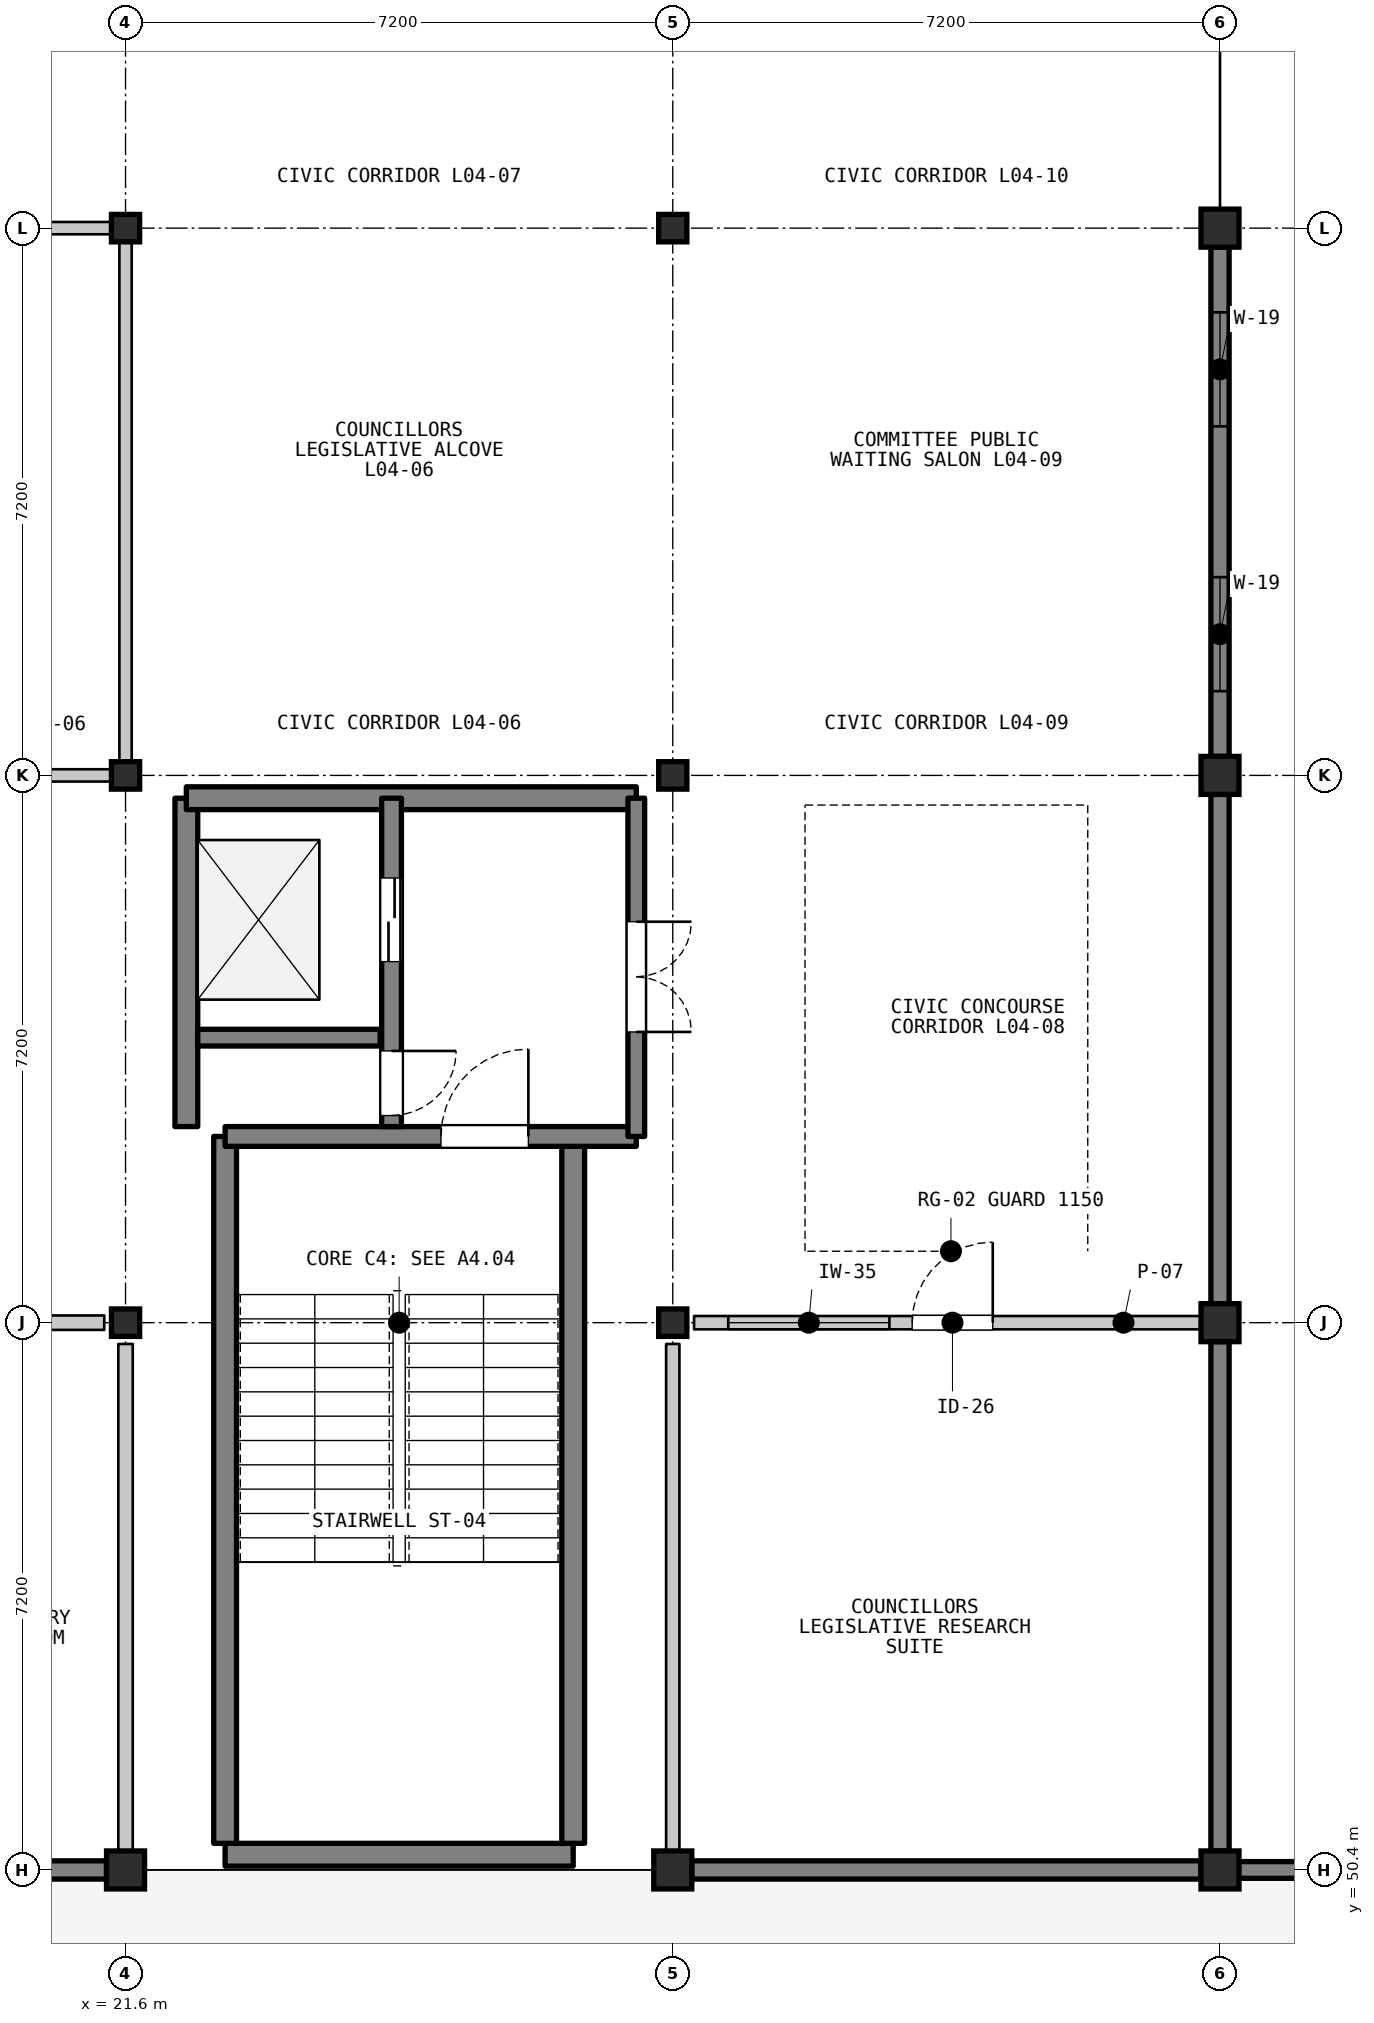
"""IFC4 building model, lengths in metres.
Left out: names, types, materials, properties, quantities, classifications, styles, units other than length and angle.
Written with IfcOpenShell. Run it as: python <this file> out.ifc"""

import sys

from ifc_helpers import new_model, si_unit, direction, frame, frame_2d, origin, origin_2d, place, context, subcontext, project, spatial, rectangle, i_section, extrude, element, fill, save


model = new_model("IFC4")
c1 = context("Model", 3, precision=1e-05, world=origin(), true_north=direction((0.0, 1.0)))
c2 = subcontext(c1, "Body", "Model", "MODEL_VIEW")
j1 = project(units=[si_unit("LENGTHUNIT", "METRE"), si_unit("PLANEANGLEUNIT", "RADIAN")], contexts=[c1])
p1 = place(None, origin())
s1 = spatial("IfcSite", under=j1, at=p1, CompositionType="ELEMENT")
p2 = place(p1, origin())
s2 = spatial("IfcBuilding", under=s1, at=p2, CompositionType="ELEMENT")
p3 = place(p2, frame((0.0, 0.0, 14.1)))
s3 = spatial("IfcBuildingStorey", under=s2, at=p3, CompositionType="ELEMENT", Elevation=14.1)
p4 = place(p3, frame((21.6, 50.4, 0.0), z_axis=(0.0, 0.0, 1.0), x_axis=(1.0, 0.0, 0.0)))
e1 = element("IfcColumn", 1, at=p4, inside=s3, PredefinedType="COLUMN", context=c2, shape_type="SweptSolid", body=[
    extrude(rectangle(XDim=0.5, YDim=0.5, at=origin_2d()), origin(), (0.0, 0.0, 1.0), 3.9),
])
for number, where, z_axis, x_axis in (
    (2, (21.6, 57.6, 0.0), (0.0, 0.0, 1.0), (1.0, 0.0, 0.0)),
    (3, (21.6, 64.8, 0.0), (0.0, 0.0, 1.0), (1.0, 0.0, 0.0)),
    (4, (21.6, 72.0, 0.0), (0.0, 0.0, 1.0), (1.0, 0.0, 0.0)),
):
    element("IfcColumn", number, at=place(p3, frame(where, z_axis=z_axis, x_axis=x_axis)), inside=s3, PredefinedType="COLUMN", context=c2, shape_type="SweptSolid", body=[
        extrude(i_section(OverallWidth=0.371, OverallDepth=0.361, WebThickness=0.012, FlangeThickness=0.02, FilletRadius=0.015, at=origin_2d()), origin(), (0.0, 0.0, 1.0), 3.9),
    ])
p5 = place(p3, frame((28.8, 50.4, 0.0), z_axis=(0.0, 0.0, 1.0), x_axis=(1.0, 0.0, 0.0)))
e5 = element("IfcColumn", 5, at=p5, inside=s3, PredefinedType="COLUMN", context=c2, shape_type="SweptSolid", body=[
    extrude(rectangle(XDim=0.5, YDim=0.5, at=origin_2d()), origin(), (0.0, 0.0, 1.0), 3.9),
])
for number, where, z_axis, x_axis in (
    (6, (28.8, 57.6, 0.0), (0.0, 0.0, 1.0), (1.0, 0.0, 0.0)),
    (7, (28.8, 64.8, 0.0), (0.0, 0.0, 1.0), (1.0, 0.0, 0.0)),
    (8, (28.8, 72.0, 0.0), (0.0, 0.0, 1.0), (1.0, 0.0, 0.0)),
):
    element("IfcColumn", number, at=place(p3, frame(where, z_axis=z_axis, x_axis=x_axis)), inside=s3, PredefinedType="COLUMN", context=c2, shape_type="SweptSolid", body=[
        extrude(i_section(OverallWidth=0.371, OverallDepth=0.361, WebThickness=0.012, FlangeThickness=0.02, FilletRadius=0.015, at=origin_2d()), origin(), (0.0, 0.0, 1.0), 3.9),
    ])
for number, where, z_axis, x_axis in (
    (9, (36.0, 50.4, 0.0), (0.0, 0.0, 1.0), (1.0, 0.0, 0.0)),
    (10, (36.0, 57.6, 0.0), (0.0, 0.0, 1.0), (1.0, 0.0, 0.0)),
    (11, (36.0, 64.8, 0.0), (0.0, 0.0, 1.0), (1.0, 0.0, 0.0)),
    (12, (36.0, 72.0, 0.0), (0.0, 0.0, 1.0), (1.0, 0.0, 0.0)),
):
    element("IfcColumn", number, at=place(p3, frame(where, z_axis=z_axis, x_axis=x_axis)), inside=s3, PredefinedType="COLUMN", context=c2, shape_type="SweptSolid", body=[
        extrude(rectangle(XDim=0.5, YDim=0.5, at=origin_2d()), origin(), (0.0, 0.0, 1.0), 3.9),
    ])
p6 = place(p3, frame((21.35, 50.4, 0.0), z_axis=(0.0, 0.0, 1.0), x_axis=(-1.0, 0.0, 0.0)))
e13 = element("IfcWall", 13, at=p6, inside=s3, PredefinedType="SOLIDWALL", context=c2, shape_type="SweptSolid", body=[
    extrude(rectangle(XDim=6.7, YDim=0.24, at=frame_2d((3.35, 0.0))), origin(), (0.0, 0.0, 1.0), 3.118),
])
p7 = place(p6, frame((1.008, 0.0, 0.95)))
e14 = element("IfcOpeningElement", 14, at=p7, cuts=e13, PredefinedType="OPENING", context=c2, shape_type="SweptSolid", body=[
    extrude(rectangle(XDim=1.2, YDim=1.7, at=frame_2d((0.6, 0.85))), frame((0.0, 0.13, 0.0), z_axis=(0.0, -1.0, 0.0), x_axis=(1.0, 0.0, 0.0)), (0.0, 0.0, 1.0), 0.26),
])
p8 = place(p6, frame((4.492, 0.0, 0.95)))
e15 = element("IfcOpeningElement", 15, at=p8, cuts=e13, PredefinedType="OPENING", context=c2, shape_type="SweptSolid", body=[
    extrude(rectangle(XDim=1.2, YDim=1.7, at=frame_2d((0.6, 0.85))), frame((0.0, 0.13, 0.0), z_axis=(0.0, -1.0, 0.0), x_axis=(1.0, 0.0, 0.0)), (0.0, 0.0, 1.0), 0.26),
])
p9 = place(p3, frame((35.75, 50.4, 0.0), z_axis=(0.0, 0.0, 1.0), x_axis=(-1.0, 0.0, 0.0)))
e16 = element("IfcWall", 16, at=p9, inside=s3, PredefinedType="SOLIDWALL", context=c2, shape_type="SweptSolid", body=[
    extrude(rectangle(XDim=6.7, YDim=0.24, at=frame_2d((3.35, 0.0))), origin(), (0.0, 0.0, 1.0), 3.118),
])
p10 = place(p3, frame((36.0, 57.35, 0.0), z_axis=(0.0, 0.0, 1.0), x_axis=(0.0, -1.0, 0.0)))
e17 = element("IfcWall", 17, at=p10, inside=s3, PredefinedType="SOLIDWALL", context=c2, shape_type="SweptSolid", body=[
    extrude(rectangle(XDim=6.7, YDim=0.24, at=frame_2d((3.35, 0.0))), origin(), (0.0, 0.0, 1.0), 3.192),
])
p11 = place(p3, frame((36.0, 64.55, 0.0), z_axis=(0.0, 0.0, 1.0), x_axis=(0.0, -1.0, 0.0)))
e18 = element("IfcWall", 18, at=p11, inside=s3, PredefinedType="SOLIDWALL", context=c2, shape_type="SweptSolid", body=[
    extrude(rectangle(XDim=6.7, YDim=0.24, at=frame_2d((3.35, 0.0))), origin(), (0.0, 0.0, 1.0), 3.192),
])
p12 = place(p3, frame((36.0, 71.75, 0.0), z_axis=(0.0, 0.0, 1.0), x_axis=(0.0, -1.0, 0.0)))
e19 = element("IfcWall", 19, at=p12, inside=s3, PredefinedType="SOLIDWALL", context=c2, shape_type="SweptSolid", body=[
    extrude(rectangle(XDim=6.7, YDim=0.24, at=frame_2d((3.35, 0.0))), origin(), (0.0, 0.0, 1.0), 3.192),
])
p13 = place(p12, frame((0.858, 0.0, 0.95)))
e20 = element("IfcOpeningElement", 20, at=p13, cuts=e19, PredefinedType="OPENING", context=c2, shape_type="SweptSolid", body=[
    extrude(rectangle(XDim=1.5, YDim=1.8, at=frame_2d((0.75, 0.9))), frame((0.0, 0.13, 0.0), z_axis=(0.0, -1.0, 0.0), x_axis=(1.0, 0.0, 0.0)), (0.0, 0.0, 1.0), 0.26),
])
p14 = place(p12, frame((4.342, 0.0, 0.95)))
e21 = element("IfcOpeningElement", 21, at=p14, cuts=e19, PredefinedType="OPENING", context=c2, shape_type="SweptSolid", body=[
    extrude(rectangle(XDim=1.5, YDim=1.8, at=frame_2d((0.75, 0.9))), frame((0.0, 0.13, 0.0), z_axis=(0.0, -1.0, 0.0), x_axis=(1.0, 0.0, 0.0)), (0.0, 0.0, 1.0), 0.26),
])
p15 = place(p3, frame((36.15, 50.4, 0.0), z_axis=(0.0, 0.0, 1.0), x_axis=(1.0, 0.0, 0.0)))
e22 = element("IfcWall", 22, at=p15, inside=s3, PredefinedType="PARAPET", context=c2, shape_type="SweptSolid", body=[
    extrude(rectangle(XDim=6.9, YDim=0.22, at=frame_2d((3.45, 0.0))), origin(), (0.0, 0.0, 1.0), 0.85),
])
p16 = place(p3, frame((22.91, 50.6, 0.0), z_axis=(0.0, 0.0, 1.0), x_axis=(1.0, 0.0, 0.0)))
e23 = element("IfcWall", 23, at=p16, inside=s3, PredefinedType="SHEAR", context=c2, shape_type="SweptSolid", body=[
    extrude(rectangle(XDim=4.58, YDim=0.3, at=frame_2d((2.29, 0.0))), origin(), (0.0, 0.0, 1.0), 3.72),
])
for number, where, z_axis, x_axis in (
    (24, (22.91, 50.75, 0.0), (0.0, 0.0, 1.0), (0.0, 1.0, 0.0)),
    (25, (27.49, 50.75, 0.0), (0.0, 0.0, 1.0), (0.0, 1.0, 0.0)),
):
    element("IfcWall", number, at=place(p3, frame(where, z_axis=z_axis, x_axis=x_axis)), inside=s3, PredefinedType="SHEAR", context=c2, shape_type="SweptSolid", body=[
        extrude(rectangle(XDim=9.3, YDim=0.3, at=frame_2d((4.65, 0.0))), origin(), (0.0, 0.0, 1.0), 3.72),
    ])
p17 = place(p3, frame((22.91, 60.05, 0.0), z_axis=(0.0, 0.0, 1.0), x_axis=(1.0, 0.0, 0.0)))
e26 = element("IfcWall", 26, at=p17, inside=s3, PredefinedType="SHEAR", context=c2, shape_type="SweptSolid", body=[
    extrude(rectangle(XDim=5.41, YDim=0.26, at=frame_2d((2.705, 0.0))), origin(), (0.0, 0.0, 1.0), 3.72),
])
p18 = place(p17, frame((2.84, 0.0, 0.0)))
e27 = element("IfcOpeningElement", 27, at=p18, cuts=e26, PredefinedType="OPENING", context=c2, shape_type="SweptSolid", body=[
    extrude(rectangle(XDim=1.15, YDim=2.15, at=frame_2d((0.575, 1.075))), frame((0.0, 0.14, 0.0), z_axis=(0.0, -1.0, 0.0), x_axis=(1.0, 0.0, 0.0)), (0.0, 0.0, 1.0), 0.28),
])
p19 = place(p3, frame((22.4, 60.18, 0.0), z_axis=(0.0, 0.0, 1.0), x_axis=(0.0, 1.0, 0.0)))
e28 = element("IfcWall", 28, at=p19, inside=s3, PredefinedType="SHEAR", context=c2, shape_type="SweptSolid", body=[
    extrude(rectangle(XDim=4.32, YDim=0.3, at=frame_2d((2.16, 0.0))), origin(), (0.0, 0.0, 1.0), 3.72),
])
p20 = place(p3, frame((22.4, 64.5, 0.0), z_axis=(0.0, 0.0, 1.0), x_axis=(1.0, 0.0, 0.0)))
e29 = element("IfcWall", 29, at=p20, inside=s3, PredefinedType="SHEAR", context=c2, shape_type="SweptSolid", body=[
    extrude(rectangle(XDim=5.92, YDim=0.3, at=frame_2d((2.96, 0.0))), origin(), (0.0, 0.0, 1.0), 3.72),
])
p21 = place(p3, frame((22.55, 61.35, 0.0), z_axis=(0.0, 0.0, 1.0), x_axis=(1.0, 0.0, 0.0)))
e30 = element("IfcWall", 30, at=p21, inside=s3, PredefinedType="SHEAR", context=c2, shape_type="SweptSolid", body=[
    extrude(rectangle(XDim=2.4, YDim=0.22, at=frame_2d((1.2, 0.0))), origin(), (0.0, 0.0, 1.0), 3.72),
])
p22 = place(p3, frame((25.1, 64.5, 0.0), z_axis=(0.0, 0.0, 1.0), x_axis=(0.0, -1.0, 0.0)))
e31 = element("IfcWall", 31, at=p22, inside=s3, PredefinedType="SHEAR", context=c2, shape_type="SweptSolid", body=[
    extrude(rectangle(XDim=4.32, YDim=0.26, at=frame_2d((2.16, 0.0))), origin(), (0.0, 0.0, 1.0), 3.72),
])
p23 = place(p22, frame((1.05, 0.0, 0.0)))
e32 = element("IfcOpeningElement", 32, at=p23, cuts=e31, PredefinedType="OPENING", context=c2, shape_type="SweptSolid", body=[
    extrude(rectangle(XDim=1.1, YDim=2.15, at=frame_2d((0.55, 1.075))), frame((0.0, 0.14, 0.0), z_axis=(0.0, -1.0, 0.0), x_axis=(1.0, 0.0, 0.0)), (0.0, 0.0, 1.0), 0.28),
])
p24 = place(p22, frame((3.325, 0.0, 0.0)))
e33 = element("IfcOpeningElement", 33, at=p24, cuts=e31, PredefinedType="OPENING", context=c2, shape_type="SweptSolid", body=[
    extrude(rectangle(XDim=0.85, YDim=2.05, at=frame_2d((0.425, 1.025))), frame((0.0, 0.14, 0.0), z_axis=(0.0, -1.0, 0.0), x_axis=(1.0, 0.0, 0.0)), (0.0, 0.0, 1.0), 0.28),
])
p25 = place(p3, frame((28.32, 64.5, 0.0), z_axis=(0.0, 0.0, 1.0), x_axis=(0.0, -1.0, 0.0)))
e34 = element("IfcWall", 34, at=p25, inside=s3, PredefinedType="SHEAR", context=c2, shape_type="SweptSolid", body=[
    extrude(rectangle(XDim=4.45, YDim=0.22, at=frame_2d((2.225, 0.0))), origin(), (0.0, 0.0, 1.0), 3.72),
])
p26 = place(p25, frame((1.625, 0.0, 0.0)))
e35 = element("IfcOpeningElement", 35, at=p26, cuts=e34, PredefinedType="OPENING", context=c2, shape_type="SweptSolid", body=[
    extrude(rectangle(XDim=1.45, YDim=2.2, at=frame_2d((0.725, 1.1))), frame((0.0, 0.12, 0.0), z_axis=(0.0, -1.0, 0.0), x_axis=(1.0, 0.0, 0.0)), (0.0, 0.0, 1.0), 0.24),
])
p27 = place(p3, frame((17.52, 57.6, 0.0), z_axis=(0.0, 0.0, 1.0), x_axis=(1.0, 0.0, 0.0)))
e36 = element("IfcWall", 36, at=p27, inside=s3, PredefinedType="PARTITIONING", context=c2, shape_type="SweptSolid", body=[
    extrude(rectangle(XDim=3.8, YDim=0.19, at=frame_2d((1.9, 0.0))), origin(), (0.0, 0.0, 1.0), 3.108),
])
p28 = place(p27, frame((1.44, 0.0, 0.0)))
e37 = element("IfcOpeningElement", 37, at=p28, cuts=e36, PredefinedType="OPENING", context=c2, shape_type="SweptSolid", body=[
    extrude(rectangle(XDim=0.92, YDim=2.1, at=frame_2d((0.46, 1.05))), frame((0.0, 0.105, 0.0), z_axis=(0.0, -1.0, 0.0), x_axis=(1.0, 0.0, 0.0)), (0.0, 0.0, 1.0), 0.21),
])
p29 = place(p3, frame((21.6, 57.32, 0.0), z_axis=(0.0, 0.0, 1.0), x_axis=(0.0, -1.0, 0.0)))
e38 = element("IfcWall", 38, at=p29, inside=s3, PredefinedType="PARTITIONING", context=c2, shape_type="SweptSolid", body=[
    extrude(rectangle(XDim=6.8, YDim=0.19, at=frame_2d((3.4, 0.0))), origin(), (0.0, 0.0, 1.0), 3.108),
])
p30 = place(p3, frame((21.48, 64.8, 0.0), z_axis=(0.0, 0.0, 1.0), x_axis=(-1.0, 0.0, 0.0)))
e39 = element("IfcWall", 39, at=p30, inside=s3, PredefinedType="PARTITIONING", context=c2, shape_type="SweptSolid", body=[
    extrude(rectangle(XDim=6.96, YDim=0.162, at=frame_2d((3.48, 0.0))), origin(), (0.0, 0.0, 1.0), 3.108),
])
p31 = place(p30, frame((2.655, 0.0, 0.0)))
e40 = element("IfcOpeningElement", 40, at=p31, cuts=e39, PredefinedType="OPENING", context=c2, shape_type="SweptSolid", body=[
    extrude(rectangle(XDim=1.65, YDim=2.35, at=frame_2d((0.825, 1.175))), frame((0.0, 0.091, 0.0), z_axis=(0.0, -1.0, 0.0), x_axis=(1.0, 0.0, 0.0)), (0.0, 0.0, 1.0), 0.182),
])
for number, where, z_axis, x_axis in (
    (41, (14.52, 72.0, 0.0), (0.0, 0.0, 1.0), (1.0, 0.0, 0.0)),
    (42, (21.6, 71.88, 0.0), (0.0, 0.0, 1.0), (0.0, -1.0, 0.0)),
):
    element("IfcWall", number, at=place(p3, frame(where, z_axis=z_axis, x_axis=x_axis)), inside=s3, PredefinedType="PARTITIONING", context=c2, shape_type="SweptSolid", body=[
        extrude(rectangle(XDim=6.96, YDim=0.162, at=frame_2d((3.48, 0.0))), origin(), (0.0, 0.0, 1.0), 3.108),
    ])
p32 = place(p3, frame((29.08, 57.6, 0.0), z_axis=(0.0, 0.0, 1.0), x_axis=(1.0, 0.0, 0.0)))
e43 = element("IfcWall", 43, at=p32, inside=s3, PredefinedType="PARTITIONING", context=c2, shape_type="SweptSolid", body=[
    extrude(rectangle(XDim=6.8, YDim=0.175, at=frame_2d((3.4, 0.0))), origin(), (0.0, 0.0, 1.0), 3.108),
])
p33 = place(p32, frame((2.87, 0.0, 0.0)))
e44 = element("IfcOpeningElement", 44, at=p33, cuts=e43, PredefinedType="OPENING", context=c2, shape_type="SweptSolid", body=[
    extrude(rectangle(XDim=1.06, YDim=2.18, at=frame_2d((0.53, 1.09))), frame((0.0, 0.097, 0.0), z_axis=(0.0, -1.0, 0.0), x_axis=(1.0, 0.0, 0.0)), (0.0, 0.0, 1.0), 0.195),
])
p34 = place(p32, frame((0.45, 0.0, 1.05)))
e45 = element("IfcOpeningElement", 45, at=p34, cuts=e43, PredefinedType="OPENING", context=c2, shape_type="SweptSolid", body=[
    extrude(rectangle(XDim=2.12, YDim=1.06, at=frame_2d((1.06, 0.53))), frame((0.0, 0.097, 0.0), z_axis=(0.0, -1.0, 0.0), x_axis=(1.0, 0.0, 0.0)), (0.0, 0.0, 1.0), 0.195),
])
p35 = place(p3, frame((28.8, 50.52, 0.0), z_axis=(0.0, 0.0, 1.0), x_axis=(0.0, 1.0, 0.0)))
e46 = element("IfcWall", 46, at=p35, inside=s3, PredefinedType="PARTITIONING", context=c2, shape_type="SweptSolid", body=[
    extrude(rectangle(XDim=6.8, YDim=0.175, at=frame_2d((3.4, 0.0))), origin(), (0.0, 0.0, 1.0), 3.108),
])
p36 = place(p13, origin())
e47 = element("IfcWindow", 47, at=p36, inside=s3, PartitioningType="SINGLE_PANEL", PredefinedType="WINDOW", context=c2, shape_type="SweptSolid", body=[
    extrude(rectangle(XDim=1.5, YDim=1.8, at=frame_2d((0.75, 0.9))), frame((0.0, 0.03, 0.0), z_axis=(0.0, -1.0, 0.0), x_axis=(1.0, 0.0, 0.0)), (0.0, 0.0, 1.0), 0.06),
])
fill(e20, e47)
p37 = place(p14, origin())
e48 = element("IfcWindow", 48, at=p37, inside=s3, PartitioningType="SINGLE_PANEL", PredefinedType="WINDOW", context=c2, shape_type="SweptSolid", body=[
    extrude(rectangle(XDim=1.5, YDim=1.8, at=frame_2d((0.75, 0.9))), frame((0.0, 0.03, 0.0), z_axis=(0.0, -1.0, 0.0), x_axis=(1.0, 0.0, 0.0)), (0.0, 0.0, 1.0), 0.06),
])
fill(e21, e48)
p38 = place(p18, origin())
e49 = element("IfcDoor", 49, at=p38, inside=s3, OperationType="SINGLE_SWING_RIGHT", PredefinedType="DOOR", context=c2, shape_type="SweptSolid", body=[
    extrude(rectangle(XDim=1.15, YDim=2.15, at=frame_2d((0.575, 1.075))), frame((0.0, 0.025, 0.0), z_axis=(0.0, -1.0, 0.0), x_axis=(1.0, 0.0, 0.0)), (0.0, 0.0, 1.0), 0.05),
])
fill(e27, e49)
p39 = place(p23, origin())
e50 = element("IfcDoor", 50, at=p39, inside=s3, OperationType="DOUBLE_DOOR_SLIDING", PredefinedType="DOOR", context=c2, shape_type="SweptSolid", body=[
    extrude(rectangle(XDim=1.1, YDim=2.15, at=frame_2d((0.55, 1.075))), frame((0.0, 0.025, 0.0), z_axis=(0.0, -1.0, 0.0), x_axis=(1.0, 0.0, 0.0)), (0.0, 0.0, 1.0), 0.05),
])
fill(e32, e50)
p40 = place(p24, origin())
e51 = element("IfcDoor", 51, at=p40, inside=s3, OperationType="SINGLE_SWING_LEFT", PredefinedType="DOOR", context=c2, shape_type="SweptSolid", body=[
    extrude(rectangle(XDim=0.85, YDim=2.05, at=frame_2d((0.425, 1.025))), frame((0.0, 0.025, 0.0), z_axis=(0.0, -1.0, 0.0), x_axis=(1.0, 0.0, 0.0)), (0.0, 0.0, 1.0), 0.05),
])
fill(e33, e51)
p41 = place(p26, origin())
e52 = element("IfcDoor", 52, at=p41, inside=s3, OperationType="DOUBLE_DOOR_SINGLE_SWING", PredefinedType="DOOR", context=c2, shape_type="SweptSolid", body=[
    extrude(rectangle(XDim=1.45, YDim=2.2, at=frame_2d((0.725, 1.1))), frame((0.0, 0.025, 0.0), z_axis=(0.0, -1.0, 0.0), x_axis=(1.0, 0.0, 0.0)), (0.0, 0.0, 1.0), 0.05),
])
fill(e35, e52)
p42 = place(p33, origin())
e53 = element("IfcDoor", 53, at=p42, inside=s3, OperationType="SINGLE_SWING_RIGHT", PredefinedType="DOOR", context=c2, shape_type="SweptSolid", body=[
    extrude(rectangle(XDim=1.06, YDim=2.18, at=frame_2d((0.53, 1.09))), frame((0.0, 0.025, 0.0), z_axis=(0.0, -1.0, 0.0), x_axis=(1.0, 0.0, 0.0)), (0.0, 0.0, 1.0), 0.05),
])
fill(e44, e53)
p43 = place(p34, origin())
e54 = element("IfcWindow", 54, at=p43, inside=s3, PartitioningType="SINGLE_PANEL", PredefinedType="WINDOW", context=c2, shape_type="SweptSolid", body=[
    extrude(rectangle(XDim=2.12, YDim=1.06, at=frame_2d((1.06, 0.53))), frame((0.0, 0.03, 0.0), z_axis=(0.0, -1.0, 0.0), x_axis=(1.0, 0.0, 0.0)), (0.0, 0.0, 1.0), 0.06),
])
fill(e45, e54)
save(model, sys.argv[1])
